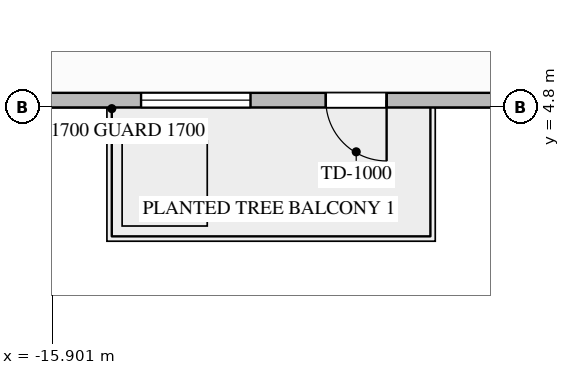
"""IFC4 building model, lengths in metres.
Left out: names, types, materials, properties, quantities, classifications, styles, units other than length and angle.
Written with IfcOpenShell. Run it as: python <this file> out.ifc"""

import sys

from ifc_helpers import new_model, si_unit, direction, frame, frame_2d, origin, place, context, subcontext, project, spatial, rectangle, extrude, element, fill, save


model = new_model("IFC4")
c1 = context("Model", 3, precision=1e-05, world=origin(), true_north=direction((0.0, 1.0)))
c2 = subcontext(c1, "Body", "Model", "MODEL_VIEW")
j1 = project(units=[si_unit("LENGTHUNIT", "METRE"), si_unit("PLANEANGLEUNIT", "RADIAN")], contexts=[c1])
p1 = place(None, origin())
s1 = spatial("IfcSite", under=j1, at=p1, CompositionType="ELEMENT")
p2 = place(p1, origin())
s2 = spatial("IfcBuilding", under=s1, at=p2, CompositionType="ELEMENT")
p3 = place(p2, frame((0.0, 0.0, 286.9)))
s3 = spatial("IfcBuildingStorey", under=s2, at=p3, CompositionType="ELEMENT", Elevation=286.9)
p4 = place(p3, frame((-8.57, 4.92, 0.0), z_axis=(0.0, 0.0, 1.0), x_axis=(-1.0, 0.0, 0.0)))
e1 = element("IfcWall", 1, at=p4, inside=s3, PredefinedType="STANDARD", context=c2, shape_type="SweptSolid", body=[
    extrude(rectangle(XDim=7.46, YDim=0.24, at=frame_2d((3.73, 0.0))), origin(), (0.0, 0.0, 1.0), 2.854),
])
p5 = place(p4, frame((1.83, 0.0, 0.0)))
e2 = element("IfcOpeningElement", 2, at=p5, cuts=e1, PredefinedType="OPENING", context=c2, shape_type="SweptSolid", body=[
    extrude(rectangle(XDim=1.0, YDim=2.2, at=frame_2d((0.5, 1.1))), frame((0.0, 0.13, 0.0), z_axis=(0.0, -1.0, 0.0), x_axis=(1.0, 0.0, 0.0)), (0.0, 0.0, 1.0), 0.26),
])
p6 = place(p4, frame((4.068, 0.0, 0.75)))
e3 = element("IfcOpeningElement", 3, at=p6, cuts=e1, PredefinedType="OPENING", context=c2, shape_type="SweptSolid", body=[
    extrude(rectangle(XDim=1.8, YDim=2.003, at=frame_2d((0.9, 1.002))), frame((0.0, 0.13, 0.0), z_axis=(0.0, -1.0, 0.0), x_axis=(1.0, 0.0, 0.0)), (0.0, 0.0, 1.0), 0.26),
])
p7 = place(p5, origin())
e4 = element("IfcDoor", 4, at=p7, inside=s3, OperationType="SINGLE_SWING_LEFT", PredefinedType="DOOR", context=c2, shape_type="SweptSolid", body=[
    extrude(rectangle(XDim=1.0, YDim=2.2, at=frame_2d((0.5, 1.1))), frame((0.0, 0.025, 0.0), z_axis=(0.0, -1.0, 0.0), x_axis=(1.0, 0.0, 0.0)), (0.0, 0.0, 1.0), 0.05),
])
fill(e2, e4)
p8 = place(p6, origin())
e5 = element("IfcWindow", 5, at=p8, inside=s3, PartitioningType="SINGLE_PANEL", PredefinedType="WINDOW", context=c2, shape_type="SweptSolid", body=[
    extrude(rectangle(XDim=1.8, YDim=2.003, at=frame_2d((0.9, 1.002))), frame((0.0, 0.03, 0.0), z_axis=(0.0, -1.0, 0.0), x_axis=(1.0, 0.0, 0.0)), (0.0, 0.0, 1.0), 0.06),
])
fill(e3, e5)
save(model, sys.argv[1])
